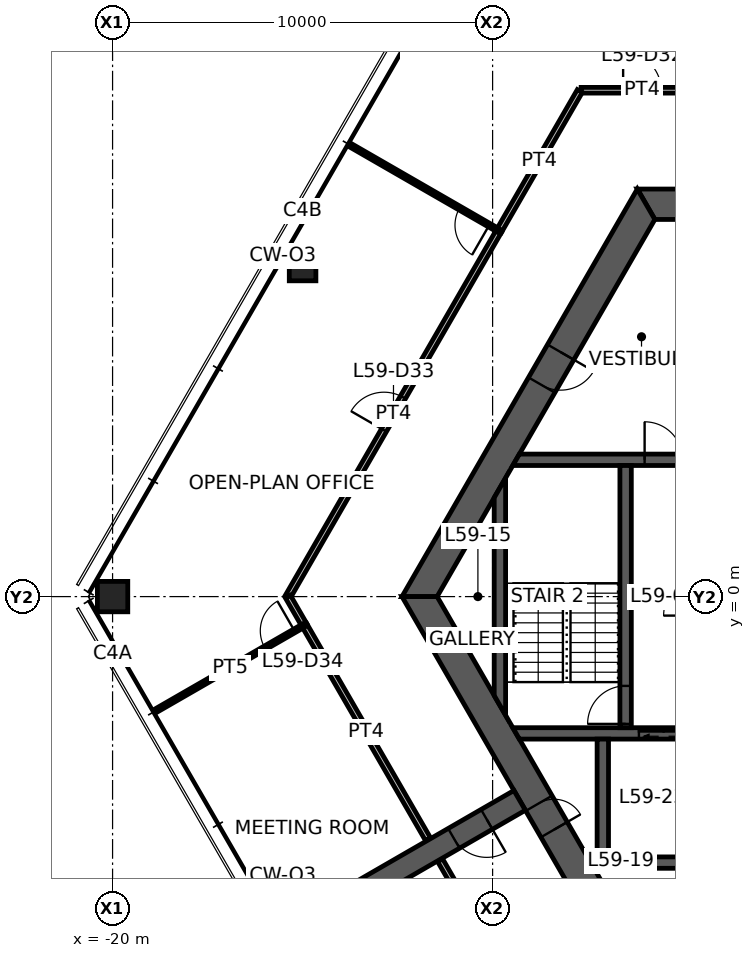
"""IFC4 building model, lengths in metres.
Left out: names, types, materials, properties, quantities, classifications, styles, units other than length and angle.
Written with IfcOpenShell. Run it as: python <this file> out.ifc"""

import sys

from ifc_helpers import new_model, si_unit, direction, frame, frame_2d, origin, origin_2d, place, context, subcontext, project, spatial, polyline, rectangle, hollow_rectangle, outline, extrude, element, fill, save


model = new_model("IFC4")
c1 = context("Model", 3, precision=1e-05, world=origin(), true_north=direction((0.0, 1.0)))
c2 = subcontext(c1, "Body", "Model", "MODEL_VIEW")
j1 = project(units=[si_unit("LENGTHUNIT", "METRE"), si_unit("PLANEANGLEUNIT", "RADIAN")], contexts=[c1])
p1 = place(None, origin())
s1 = spatial("IfcSite", under=j1, at=p1, CompositionType="ELEMENT")
p2 = place(p1, origin())
s2 = spatial("IfcBuilding", under=s1, at=p2, CompositionType="ELEMENT")
p3 = place(p2, frame((0.0, 0.0, 236.2)))
s3 = spatial("IfcBuildingStorey", under=s2, at=p3, CompositionType="ELEMENT", Elevation=236.2)
p4 = place(p3, frame((-20.0, 0.0, 0.0), z_axis=(0.0, 0.0, 1.0), x_axis=(1.0, 0.0, 0.0)))
e1 = element("IfcColumn", 1, at=p4, inside=s3, PredefinedType="COLUMN", context=c2, shape_type="SweptSolid", body=[
    extrude(hollow_rectangle(XDim=0.8, YDim=0.8, WallThickness=0.04, at=origin_2d()), origin(), (0.0, 0.0, 1.0), 3.9),
])
p5 = place(p3, frame((-15.0, 8.66, 0.0), z_axis=(0.0, 0.0, 1.0), x_axis=(1.0, 0.0, 0.0)))
e2 = element("IfcColumn", 2, at=p5, inside=s3, PredefinedType="COLUMN", context=c2, shape_type="SweptSolid", body=[
    extrude(hollow_rectangle(XDim=0.7, YDim=0.7, WallThickness=0.032, at=origin_2d()), origin(), (0.0, 0.0, 1.0), 3.9),
])
p6 = place(p3, frame((5.961, 10.325, 0.0), z_axis=(0.0, 0.0, 1.0), x_axis=(-1.0, 0.0, 0.0)))
e3 = element("IfcWall", 3, at=p6, inside=s3, PredefinedType="SHEAR", context=c2, shape_type="SweptSolid", body=[
    extrude(outline(polyline([(-0.231, -0.4), (4.636, -0.4), (5.536, -0.4), (6.386, -0.4), (7.286, -0.4), (12.153, -0.4), (11.691, 0.4), (7.286, 0.4), (6.386, 0.4), (5.536, 0.4), (4.636, 0.4), (0.231, 0.4), (-0.231, -0.4)])), origin(), (0.0, 0.0, 1.0), 3.9),
])
p7 = place(p6, frame((6.386, 0.0, 0.0)))
e4 = element("IfcOpeningElement", 4, at=p7, cuts=e3, PredefinedType="OPENING", context=c2, shape_type="SweptSolid", body=[
    extrude(rectangle(XDim=0.9, YDim=2.1, at=frame_2d((0.45, 1.05))), frame((0.0, 0.41, 0.0), z_axis=(0.0, -1.0, 0.0), x_axis=(1.0, 0.0, 0.0)), (0.0, 0.0, 1.0), 0.82),
])
p8 = place(p6, frame((4.636, 0.0, 0.0)))
e5 = element("IfcOpeningElement", 5, at=p8, cuts=e3, PredefinedType="OPENING", context=c2, shape_type="SweptSolid", body=[
    extrude(rectangle(XDim=0.9, YDim=2.1, at=frame_2d((0.45, 1.05))), frame((0.0, 0.41, 0.0), z_axis=(0.0, -1.0, 0.0), x_axis=(1.0, 0.0, 0.0)), (0.0, 0.0, 1.0), 0.82),
])
p9 = place(p3, frame((-5.961, 10.325, 0.0), z_axis=(0.0, 0.0, 1.0), x_axis=(-0.500004296715, -0.866022923061, 0.0)))
e6 = element("IfcWall", 6, at=p9, inside=s3, PredefinedType="SHEAR", context=c2, shape_type="SweptSolid", body=[
    extrude(outline(polyline([(-0.231, -0.4), (4.494, -0.4), (5.494, -0.4), (12.153, -0.4), (11.691, 0.4), (5.494, 0.4), (4.494, 0.4), (0.231, 0.4), (-0.231, -0.4)])), origin(), (0.0, 0.0, 1.0), 3.9),
])
p10 = place(p9, frame((4.494, 0.0, 0.0)))
e7 = element("IfcOpeningElement", 7, at=p10, cuts=e6, PredefinedType="OPENING", context=c2, shape_type="SweptSolid", body=[
    extrude(rectangle(XDim=1.0, YDim=2.1, at=frame_2d((0.5, 1.05))), frame((0.0, 0.41, 0.0), z_axis=(0.0, -1.0, 0.0), x_axis=(1.0, 0.0, 0.0)), (0.0, 0.0, 1.0), 0.82),
])
p11 = place(p3, frame((-11.922, 0.0, 0.0), z_axis=(0.0, 0.0, 1.0), x_axis=(0.500004296715, -0.866022923061, 0.0)))
e8 = element("IfcWall", 8, at=p11, inside=s3, PredefinedType="SHEAR", context=c2, shape_type="SweptSolid", body=[
    extrude(outline(polyline([(-0.231, -0.4), (6.281, -0.4), (7.081, -0.4), (12.153, -0.4), (11.691, 0.4), (7.081, 0.4), (6.281, 0.4), (0.231, 0.4), (-0.231, -0.4)])), origin(), (0.0, 0.0, 1.0), 3.9),
])
p12 = place(p11, frame((6.281, 0.0, 0.0)))
e9 = element("IfcOpeningElement", 9, at=p12, cuts=e8, PredefinedType="OPENING", context=c2, shape_type="SweptSolid", body=[
    extrude(rectangle(XDim=0.8, YDim=2.1, at=frame_2d((0.4, 1.05))), frame((0.0, 0.41, 0.0), z_axis=(0.0, -1.0, 0.0), x_axis=(1.0, 0.0, 0.0)), (0.0, 0.0, 1.0), 0.82),
])
p13 = place(p3, frame((-9.288, -5.363, 0.0), z_axis=(0.0, 0.0, 1.0), x_axis=(-0.866027473358, -0.499996415376, 0.0)))
e10 = element("IfcWall", 10, at=p13, inside=s3, PredefinedType="SHEAR", context=c2, shape_type="SweptSolid", body=[
    extrude(rectangle(XDim=7.045, YDim=0.6, at=frame_2d((3.523, 0.0))), origin(), (0.0, 0.0, 1.0), 3.9),
])
p14 = place(p13, frame((1.0, 0.0, 0.0)))
e11 = element("IfcOpeningElement", 11, at=p14, cuts=e10, PredefinedType="OPENING", context=c2, shape_type="SweptSolid", body=[
    extrude(rectangle(XDim=1.0, YDim=2.1, at=frame_2d((0.5, 1.05))), frame((0.0, 0.31, 0.0), z_axis=(0.0, -1.0, 0.0), x_axis=(1.0, 0.0, 0.0)), (0.0, 0.0, 1.0), 0.62),
])
p15 = place(p3, frame((-9.382, 3.6, 0.0), z_axis=(0.0, 0.0, 1.0), x_axis=(1.0, 0.0, 0.0)))
e12 = element("IfcWall", 12, at=p15, inside=s3, PredefinedType="SHEAR", context=c2, shape_type="SweptSolid", body=[
    extrude(outline(polyline([(-0.087, -0.15), (3.382, -0.15), (4.382, -0.15), (5.782, -0.15), (6.882, -0.15), (7.932, -0.15), (7.932, 0.15), (6.882, 0.15), (5.782, 0.15), (4.382, 0.15), (3.382, 0.15), (0.087, 0.15), (-0.087, -0.15)])), origin(), (0.0, 0.0, 1.0), 3.9),
])
p16 = place(p15, frame((3.382, 0.0, 0.0)))
e13 = element("IfcOpeningElement", 13, at=p16, cuts=e12, PredefinedType="OPENING", context=c2, shape_type="SweptSolid", body=[
    extrude(rectangle(XDim=1.0, YDim=2.1, at=frame_2d((0.5, 1.05))), frame((0.0, 0.16, 0.0), z_axis=(0.0, -1.0, 0.0), x_axis=(1.0, 0.0, 0.0)), (0.0, 0.0, 1.0), 0.32),
])
p17 = place(p15, frame((5.782, 0.0, 0.0)))
e14 = element("IfcOpeningElement", 14, at=p17, cuts=e12, PredefinedType="OPENING", context=c2, shape_type="SweptSolid", body=[
    extrude(rectangle(XDim=1.1, YDim=2.1, at=frame_2d((0.55, 1.05))), frame((0.0, 0.16, 0.0), z_axis=(0.0, -1.0, 0.0), x_axis=(1.0, 0.0, 0.0)), (0.0, 0.0, 1.0), 0.32),
])
p18 = place(p3, frame((-9.382, -3.6, 0.0), z_axis=(0.0, 0.0, 1.0), x_axis=(1.0, 0.0, 0.0)))
e15 = element("IfcWall", 15, at=p18, inside=s3, PredefinedType="SHEAR", context=c2, shape_type="SweptSolid", body=[
    extrude(outline(polyline([(0.087, -0.15), (3.232, -0.15), (4.532, -0.15), (5.782, -0.15), (6.882, -0.15), (7.932, -0.15), (7.932, 0.15), (6.882, 0.15), (5.782, 0.15), (4.532, 0.15), (3.232, 0.15), (-0.087, 0.15), (0.087, -0.15)])), origin(), (0.0, 0.0, 1.0), 3.9),
])
p19 = place(p18, frame((5.782, 0.0, 0.0)))
e16 = element("IfcOpeningElement", 16, at=p19, cuts=e15, PredefinedType="OPENING", context=c2, shape_type="SweptSolid", body=[
    extrude(rectangle(XDim=1.1, YDim=2.1, at=frame_2d((0.55, 1.05))), frame((0.0, 0.16, 0.0), z_axis=(0.0, -1.0, 0.0), x_axis=(1.0, 0.0, 0.0)), (0.0, 0.0, 1.0), 0.32),
])
p20 = place(p18, frame((3.232, 0.0, 0.0)))
e17 = element("IfcOpeningElement", 17, at=p20, cuts=e15, PredefinedType="OPENING", context=c2, shape_type="SweptSolid", body=[
    extrude(rectangle(XDim=1.3, YDim=2.1, at=frame_2d((0.65, 1.05))), frame((0.0, 0.16, 0.0), z_axis=(0.0, -1.0, 0.0), x_axis=(1.0, 0.0, 0.0)), (0.0, 0.0, 1.0), 0.32),
])
p21 = place(p3, frame((-6.5, -3.45, 0.0), z_axis=(0.0, 0.0, 1.0), x_axis=(0.0, 1.0, 0.0)))
e18 = element("IfcWall", 18, at=p21, inside=s3, PredefinedType="SHEAR", context=c2, shape_type="SweptSolid", body=[
    extrude(rectangle(XDim=6.9, YDim=0.3, at=frame_2d((3.45, 0.0))), origin(), (0.0, 0.0, 1.0), 3.9),
])
p22 = place(p21, frame((0.1, 0.0, 0.0)))
e19 = element("IfcOpeningElement", 19, at=p22, cuts=e18, PredefinedType="OPENING", context=c2, shape_type="SweptSolid", body=[
    extrude(rectangle(XDim=1.0, YDim=2.1, at=frame_2d((0.5, 1.05))), frame((0.0, 0.16, 0.0), z_axis=(0.0, -1.0, 0.0), x_axis=(1.0, 0.0, 0.0)), (0.0, 0.0, 1.0), 0.32),
])
p23 = place(p3, frame((-7.25, -7.0, 0.0), z_axis=(0.0, 0.0, 1.0), x_axis=(1.0, 0.0, 0.0)))
e20 = element("IfcWall", 20, at=p23, inside=s3, PredefinedType="SHEAR", context=c2, shape_type="SweptSolid", body=[
    extrude(rectangle(XDim=2.6, YDim=0.3, at=frame_2d((1.3, 0.0))), origin(), (0.0, 0.0, 1.0), 3.9),
])
p24 = place(p3, frame((-7.1, -3.75, 0.0), z_axis=(0.0, 0.0, 1.0), x_axis=(0.0, -1.0, 0.0)))
e21 = element("IfcWall", 21, at=p24, inside=s3, PredefinedType="SHEAR", context=c2, shape_type="SweptSolid", body=[
    extrude(rectangle(XDim=3.1, YDim=0.3, at=frame_2d((1.55, 0.0))), origin(), (0.0, 0.0, 1.0), 3.9),
])
p25 = place(p3, frame((-9.808, -2.862, 0.0), z_axis=(0.0, 0.0, 1.0), x_axis=(0.0, 1.0, 0.0)))
e22 = element("IfcWall", 22, at=p25, inside=s3, PredefinedType="SHEAR", context=c2, shape_type="SweptSolid", body=[
    extrude(outline(polyline([(-0.26, -0.15), (5.984, -0.15), (5.465, 0.15), (0.26, 0.15), (-0.26, -0.15)])), origin(), (0.0, 0.0, 1.0), 3.9),
])
p26 = place(p3, frame((-7.67, 13.325, 0.0), z_axis=(0.0, 0.0, 1.0), x_axis=(1.0, 0.0, 0.0)))
e23 = element("IfcWall", 23, at=p26, inside=s3, PredefinedType="PARTITIONING", context=c2, shape_type="SweptSolid", body=[
    extrude(rectangle(XDim=3.21, YDim=0.15, at=frame_2d((1.605, 0.0))), origin(), (0.0, 0.0, 1.0), 2.95),
])
p27 = place(p26, frame((1.105, 0.0, 0.0)))
e24 = element("IfcOpeningElement", 24, at=p27, cuts=e23, PredefinedType="OPENING", context=c2, shape_type="SweptSolid", body=[
    extrude(rectangle(XDim=1.0, YDim=2.1, at=frame_2d((0.5, 1.05))), frame((0.0, 0.085, 0.0), z_axis=(0.0, -1.0, 0.0), x_axis=(1.0, 0.0, 0.0)), (0.0, 0.0, 1.0), 0.17),
])
p28 = place(p3, frame((-11.7, -6.385, 0.0), z_axis=(0.0, 0.0, 1.0), x_axis=(-0.500003537243, 0.866023361547, 0.0)))
e25 = element("IfcWall", 25, at=p28, inside=s3, PredefinedType="PARTITIONING", context=c2, shape_type="SweptSolid", body=[
    extrude(rectangle(XDim=6.516, YDim=0.15, at=frame_2d((3.258, 0.0))), origin(), (0.0, 0.0, 1.0), 2.95),
])
p29 = place(p3, frame((-9.835, 9.616, 0.0), z_axis=(0.0, 0.0, 1.0), x_axis=(0.500078009402, 0.86598036035, 0.0)))
e26 = element("IfcWall", 26, at=p29, inside=s3, PredefinedType="PARTITIONING", context=c2, shape_type="SweptSolid", body=[
    extrude(rectangle(XDim=4.26, YDim=0.15, at=frame_2d((2.13, 0.0))), origin(), (0.0, 0.0, 1.0), 2.95),
])
p30 = place(p3, frame((-15.386, 0.0, 0.0), z_axis=(0.0, 0.0, 1.0), x_axis=(0.50000453164, 0.866022787425, 0.0)))
e27 = element("IfcWall", 27, at=p30, inside=s3, PredefinedType="PARTITIONING", context=c2, shape_type="SweptSolid", body=[
    extrude(rectangle(XDim=11.113, YDim=0.15, at=frame_2d((5.557, 0.0))), origin(), (0.0, 0.0, 1.0), 2.95),
])
p31 = place(p30, frame((5.057, 0.0, 0.0)))
e28 = element("IfcOpeningElement", 28, at=p31, cuts=e27, PredefinedType="OPENING", context=c2, shape_type="SweptSolid", body=[
    extrude(rectangle(XDim=1.0, YDim=2.1, at=frame_2d((0.5, 1.05))), frame((0.0, 0.085, 0.0), z_axis=(0.0, -1.0, 0.0), x_axis=(1.0, 0.0, 0.0)), (0.0, 0.0, 1.0), 0.17),
])
p32 = place(p3, frame((-14.953, -0.75, 0.0), z_axis=(0.0, 0.0, 1.0), x_axis=(-0.500258826225, 0.865875918815, 0.0)))
e29 = element("IfcWall", 29, at=p32, inside=s3, PredefinedType="PARTITIONING", context=c2, shape_type="SweptSolid", body=[
    extrude(rectangle(XDim=0.867, YDim=0.15, at=frame_2d((0.433, 0.0))), origin(), (0.0, 0.0, 1.0), 2.95),
])
p33 = place(p3, frame((-18.857, -3.0, 0.0), z_axis=(0.0, 0.0, 1.0), x_axis=(0.866517357236, 0.4991469419, 0.0)))
e30 = element("IfcWall", 30, at=p33, inside=s3, PredefinedType="PARTITIONING", context=c2, shape_type="SweptSolid", body=[
    extrude(rectangle(XDim=4.506, YDim=0.1, at=frame_2d((2.253, 0.0))), origin(), (0.0, 0.0, 1.0), 2.95),
])
p34 = place(p33, frame((3.306, 0.0, 0.0)))
e31 = element("IfcOpeningElement", 31, at=p34, cuts=e30, PredefinedType="OPENING", context=c2, shape_type="SweptSolid", body=[
    extrude(rectangle(XDim=0.9, YDim=2.1, at=frame_2d((0.45, 1.05))), frame((0.0, 0.06, 0.0), z_axis=(0.0, -1.0, 0.0), x_axis=(1.0, 0.0, 0.0)), (0.0, 0.0, 1.0), 0.12),
])
p35 = place(p3, frame((-9.83, 9.624, 0.0), z_axis=(0.0, 0.0, 1.0), x_axis=(-0.866527293697, 0.499129691842, 0.0)))
e32 = element("IfcWall", 32, at=p35, inside=s3, PredefinedType="PARTITIONING", context=c2, shape_type="SweptSolid", body=[
    extrude(rectangle(XDim=4.505, YDim=0.1, at=frame_2d((2.253, 0.0))), origin(), (0.0, 0.0, 1.0), 2.95),
])
p36 = place(p35, frame((0.3, 0.0, 0.0)))
e33 = element("IfcOpeningElement", 33, at=p36, cuts=e32, PredefinedType="OPENING", context=c2, shape_type="SweptSolid", body=[
    extrude(rectangle(XDim=0.9, YDim=2.1, at=frame_2d((0.45, 1.05))), frame((0.0, 0.06, 0.0), z_axis=(0.0, -1.0, 0.0), x_axis=(1.0, 0.0, 0.0)), (0.0, 0.0, 1.0), 0.12),
])
p37 = place(p3, frame((-10.738, -8.052, 0.0), z_axis=(0.0, 0.0, 1.0), x_axis=(-0.500084415177, 0.865976661173, 0.0)))
e34 = element("IfcWall", 34, at=p37, inside=s3, PredefinedType="PARTITIONING", context=c2, shape_type="SweptSolid", body=[
    extrude(rectangle(XDim=1.284, YDim=0.15, at=frame_2d((0.642, 0.0))), origin(), (0.0, 0.0, 1.0), 2.95),
])
p38 = place(p12, origin())
e35 = element("IfcDoor", 35, at=p38, inside=s3, OperationType="SINGLE_SWING_RIGHT", PredefinedType="DOOR", context=c2, shape_type="SweptSolid", body=[
    extrude(rectangle(XDim=0.8, YDim=2.1, at=frame_2d((0.4, 1.05))), frame((0.0, 0.025, 0.0), z_axis=(0.0, -1.0, 0.0), x_axis=(1.0, 0.0, 0.0)), (0.0, 0.0, 1.0), 0.05),
])
fill(e9, e35)
p39 = place(p10, origin())
e36 = element("IfcDoor", 36, at=p39, inside=s3, OperationType="SINGLE_SWING_LEFT", PredefinedType="DOOR", context=c2, shape_type="SweptSolid", body=[
    extrude(rectangle(XDim=1.0, YDim=2.1, at=frame_2d((0.5, 1.05))), frame((0.0, 0.025, 0.0), z_axis=(0.0, -1.0, 0.0), x_axis=(1.0, 0.0, 0.0)), (0.0, 0.0, 1.0), 0.05),
])
fill(e7, e36)
p40 = place(p22, origin())
e37 = element("IfcDoor", 37, at=p40, inside=s3, OperationType="SINGLE_SWING_LEFT", PredefinedType="DOOR", context=c2, shape_type="SweptSolid", body=[
    extrude(rectangle(XDim=1.0, YDim=2.1, at=frame_2d((0.5, 1.05))), frame((0.0, 0.025, 0.0), z_axis=(0.0, -1.0, 0.0), x_axis=(1.0, 0.0, 0.0)), (0.0, 0.0, 1.0), 0.05),
])
fill(e19, e37)
p41 = place(p16, origin())
e38 = element("IfcDoor", 38, at=p41, inside=s3, OperationType="SINGLE_SWING_LEFT", PredefinedType="DOOR", context=c2, shape_type="SweptSolid", body=[
    extrude(rectangle(XDim=1.0, YDim=2.1, at=frame_2d((0.5, 1.05))), frame((0.0, 0.025, 0.0), z_axis=(0.0, -1.0, 0.0), x_axis=(1.0, 0.0, 0.0)), (0.0, 0.0, 1.0), 0.05),
])
fill(e13, e38)
p42 = place(p14, origin())
e39 = element("IfcDoor", 39, at=p42, inside=s3, OperationType="SINGLE_SWING_LEFT", PredefinedType="DOOR", context=c2, shape_type="SweptSolid", body=[
    extrude(rectangle(XDim=1.0, YDim=2.1, at=frame_2d((0.5, 1.05))), frame((0.0, 0.025, 0.0), z_axis=(0.0, -1.0, 0.0), x_axis=(1.0, 0.0, 0.0)), (0.0, 0.0, 1.0), 0.05),
])
fill(e11, e39)
p43 = place(p27, origin())
e40 = element("IfcDoor", 40, at=p43, inside=s3, OperationType="SINGLE_SWING_LEFT", PredefinedType="DOOR", context=c2, shape_type="SweptSolid", body=[
    extrude(rectangle(XDim=1.0, YDim=2.1, at=frame_2d((0.5, 1.05))), frame((0.0, 0.025, 0.0), z_axis=(0.0, -1.0, 0.0), x_axis=(1.0, 0.0, 0.0)), (0.0, 0.0, 1.0), 0.05),
])
fill(e24, e40)
p44 = place(p31, origin())
e41 = element("IfcDoor", 41, at=p44, inside=s3, OperationType="SINGLE_SWING_LEFT", PredefinedType="DOOR", context=c2, shape_type="SweptSolid", body=[
    extrude(rectangle(XDim=1.0, YDim=2.1, at=frame_2d((0.5, 1.05))), frame((0.0, 0.025, 0.0), z_axis=(0.0, -1.0, 0.0), x_axis=(1.0, 0.0, 0.0)), (0.0, 0.0, 1.0), 0.05),
])
fill(e28, e41)
p45 = place(p34, origin())
e42 = element("IfcDoor", 42, at=p45, inside=s3, OperationType="SINGLE_SWING_RIGHT", PredefinedType="DOOR", context=c2, shape_type="SweptSolid", body=[
    extrude(rectangle(XDim=0.9, YDim=2.1, at=frame_2d((0.45, 1.05))), frame((0.0, 0.025, 0.0), z_axis=(0.0, -1.0, 0.0), x_axis=(1.0, 0.0, 0.0)), (0.0, 0.0, 1.0), 0.05),
])
fill(e31, e42)
p46 = place(p36, origin())
e43 = element("IfcDoor", 43, at=p46, inside=s3, OperationType="SINGLE_SWING_LEFT", PredefinedType="DOOR", context=c2, shape_type="SweptSolid", body=[
    extrude(rectangle(XDim=0.9, YDim=2.1, at=frame_2d((0.45, 1.05))), frame((0.0, 0.025, 0.0), z_axis=(0.0, -1.0, 0.0), x_axis=(1.0, 0.0, 0.0)), (0.0, 0.0, 1.0), 0.05),
])
fill(e33, e43)
p47 = place(p20, origin())
e44 = element("IfcDoor", 44, at=p47, inside=s3, OperationType="DOUBLE_DOOR_SLIDING", PredefinedType="DOOR", context=c2, shape_type="SweptSolid", body=[
    extrude(rectangle(XDim=1.3, YDim=2.1, at=frame_2d((0.65, 1.05))), frame((0.0, 0.025, 0.0), z_axis=(0.0, -1.0, 0.0), x_axis=(1.0, 0.0, 0.0)), (0.0, 0.0, 1.0), 0.05),
])
fill(e17, e44)
save(model, sys.argv[1])
